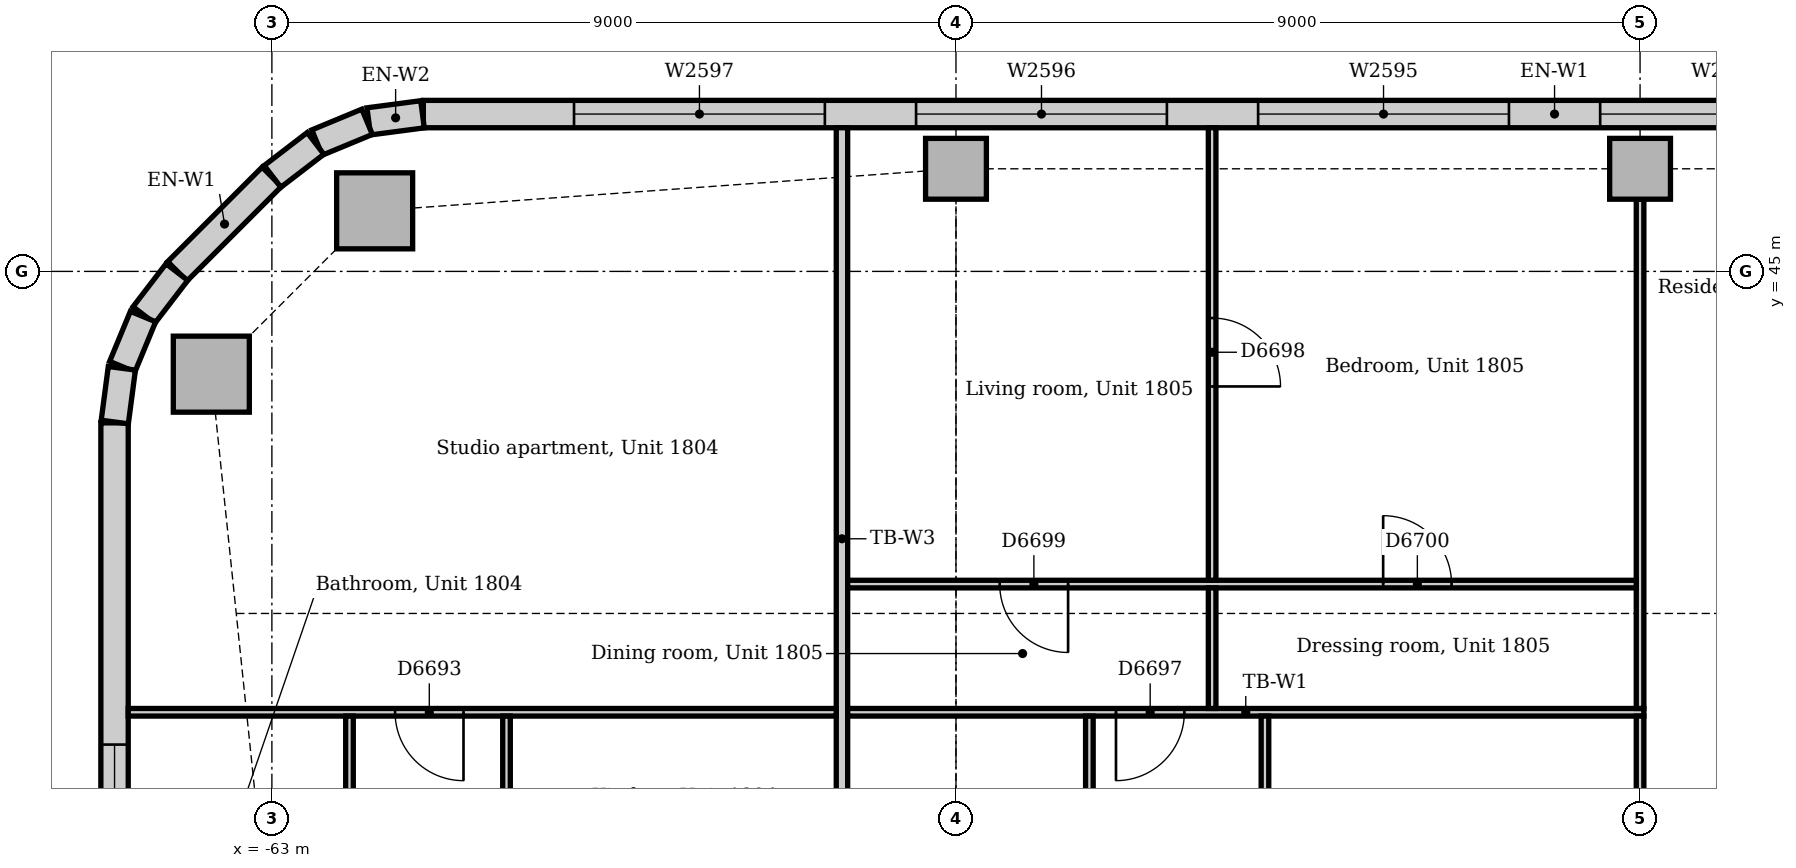
"""IFC4 building model, lengths in metres.
Left out: names, types, materials, properties, quantities, classifications, styles, units other than length and angle.
Written with IfcOpenShell. Run it as: python <this file> out.ifc"""

import sys

from ifc_helpers import new_model, si_unit, direction, frame, frame_2d, origin, origin_2d, place, context, subcontext, project, spatial, rectangle, extrude, element, fill, save


model = new_model("IFC4")
c1 = context("Model", 3, precision=1e-05, world=origin(), true_north=direction((0.0, 1.0)))
c2 = subcontext(c1, "Body", "Model", "MODEL_VIEW")
j1 = project(units=[si_unit("LENGTHUNIT", "METRE"), si_unit("PLANEANGLEUNIT", "RADIAN")], contexts=[c1])
p1 = place(None, origin())
s1 = spatial("IfcSite", under=j1, at=p1, CompositionType="ELEMENT")
p2 = place(p1, origin())
s2 = spatial("IfcBuilding", under=s1, at=p2, CompositionType="ELEMENT")
p3 = place(p2, frame((0.0, 0.0, 79.0)))
s3 = spatial("IfcBuildingStorey", under=s2, at=p3, CompositionType="ELEMENT", Elevation=79.0)
for number, where, z_axis, x_axis in (
    (1, (-61.648, 45.797, 0.0), (0.0, 0.0, 1.0), (1.0, 0.0, 0.0)),
    (2, (-63.797, 43.648, 0.0), (0.0, 0.0, 1.0), (1.0, 0.0, 0.0)),
):
    element("IfcColumn", number, at=place(p3, frame(where, z_axis=z_axis, x_axis=x_axis)), inside=s3, PredefinedType="COLUMN", context=c2, shape_type="SweptSolid", body=[
        extrude(rectangle(XDim=1.0, YDim=1.0, at=origin_2d()), origin(), (0.0, 0.0, 1.0), 3.85),
    ])
for number, where, z_axis, x_axis in (
    (3, (-54.0, 46.35, 0.0), (0.0, 0.0, 1.0), (1.0, 0.0, 0.0)),
    (4, (-45.0, 46.35, 0.0), (0.0, 0.0, 1.0), (1.0, 0.0, 0.0)),
):
    element("IfcColumn", number, at=place(p3, frame(where, z_axis=z_axis, x_axis=x_axis)), inside=s3, PredefinedType="COLUMN", context=c2, shape_type="SweptSolid", body=[
        extrude(rectangle(XDim=0.8, YDim=0.8, at=origin_2d()), origin(), (0.0, 0.0, 1.0), 3.85),
    ])
p4 = place(p3, frame((-31.243, 47.07, 0.0), z_axis=(0.0, 0.0, 1.0), x_axis=(-1.0, 0.0, 0.0)))
e5 = element("IfcWall", 5, at=p4, inside=s3, PredefinedType="STANDARD", context=c2, shape_type="SweptSolid", body=[
    extrude(rectangle(XDim=29.765, YDim=0.36, at=frame_2d((14.882, 0.0))), origin(), (0.0, 0.0, 1.0), 3.85),
])
p5 = place(p4, frame((1.982, 0.0, 0.9)))
e6 = element("IfcOpeningElement", 6, at=p5, cuts=e5, PredefinedType="OPENING", context=c2, shape_type="SweptSolid", body=[
    extrude(rectangle(XDim=3.3, YDim=1.6, at=frame_2d((1.65, 0.8))), frame((0.0, 0.19, 0.0), z_axis=(0.0, -1.0, 0.0), x_axis=(1.0, 0.0, 0.0)), (0.0, 0.0, 1.0), 0.38),
])
p6 = place(p4, frame((6.482, 0.0, 0.9)))
e7 = element("IfcOpeningElement", 7, at=p6, cuts=e5, PredefinedType="OPENING", context=c2, shape_type="SweptSolid", body=[
    extrude(rectangle(XDim=3.3, YDim=1.6, at=frame_2d((1.65, 0.8))), frame((0.0, 0.19, 0.0), z_axis=(0.0, -1.0, 0.0), x_axis=(1.0, 0.0, 0.0)), (0.0, 0.0, 1.0), 0.38),
])
p7 = place(p4, frame((10.982, 0.0, 0.9)))
e8 = element("IfcOpeningElement", 8, at=p7, cuts=e5, PredefinedType="OPENING", context=c2, shape_type="SweptSolid", body=[
    extrude(rectangle(XDim=3.3, YDim=1.6, at=frame_2d((1.65, 0.8))), frame((0.0, 0.19, 0.0), z_axis=(0.0, -1.0, 0.0), x_axis=(1.0, 0.0, 0.0)), (0.0, 0.0, 1.0), 0.38),
])
p8 = place(p4, frame((15.482, 0.0, 0.9)))
e9 = element("IfcOpeningElement", 9, at=p8, cuts=e5, PredefinedType="OPENING", context=c2, shape_type="SweptSolid", body=[
    extrude(rectangle(XDim=3.3, YDim=1.6, at=frame_2d((1.65, 0.8))), frame((0.0, 0.19, 0.0), z_axis=(0.0, -1.0, 0.0), x_axis=(1.0, 0.0, 0.0)), (0.0, 0.0, 1.0), 0.38),
])
p9 = place(p4, frame((19.982, 0.0, 0.9)))
e10 = element("IfcOpeningElement", 10, at=p9, cuts=e5, PredefinedType="OPENING", context=c2, shape_type="SweptSolid", body=[
    extrude(rectangle(XDim=3.3, YDim=1.6, at=frame_2d((1.65, 0.8))), frame((0.0, 0.19, 0.0), z_axis=(0.0, -1.0, 0.0), x_axis=(1.0, 0.0, 0.0)), (0.0, 0.0, 1.0), 0.38),
])
p10 = place(p4, frame((24.482, 0.0, 0.9)))
e11 = element("IfcOpeningElement", 11, at=p10, cuts=e5, PredefinedType="OPENING", context=c2, shape_type="SweptSolid", body=[
    extrude(rectangle(XDim=3.3, YDim=1.6, at=frame_2d((1.65, 0.8))), frame((0.0, 0.19, 0.0), z_axis=(0.0, -1.0, 0.0), x_axis=(1.0, 0.0, 0.0)), (0.0, 0.0, 1.0), 0.38),
])
p11 = place(p3, frame((-63.001, 46.244, 0.0), z_axis=(0.0, 0.0, 1.0), x_axis=(-0.707106781187, -0.707106781187, 0.0)))
e12 = element("IfcWall", 12, at=p11, inside=s3, PredefinedType="STANDARD", context=c2, shape_type="SweptSolid", body=[
    extrude(rectangle(XDim=1.757, YDim=0.36, at=frame_2d((0.879, 0.0))), origin(), (0.0, 0.0, 1.0), 3.85),
])
p12 = place(p3, frame((-65.07, 43.007, 0.0), z_axis=(0.0, 0.0, 1.0), x_axis=(0.0, -1.0, 0.0)))
e13 = element("IfcWall", 13, at=p12, inside=s3, PredefinedType="STANDARD", context=c2, shape_type="SweptSolid", body=[
    extrude(rectangle(XDim=23.765, YDim=0.36, at=frame_2d((11.882, 0.0))), origin(), (0.0, 0.0, 1.0), 3.85),
])
p13 = place(p12, frame((4.232, 0.0, 0.9)))
e14 = element("IfcOpeningElement", 14, at=p13, cuts=e13, PredefinedType="OPENING", context=c2, shape_type="SweptSolid", body=[
    extrude(rectangle(XDim=1.8, YDim=1.6, at=frame_2d((0.9, 0.8))), frame((0.0, 0.19, 0.0), z_axis=(0.0, -1.0, 0.0), x_axis=(1.0, 0.0, 0.0)), (0.0, 0.0, 1.0), 0.38),
])
p14 = place(p12, frame((9.332, 0.0, 0.9)))
e15 = element("IfcOpeningElement", 15, at=p14, cuts=e13, PredefinedType="OPENING", context=c2, shape_type="SweptSolid", body=[
    extrude(rectangle(XDim=1.8, YDim=1.6, at=frame_2d((0.9, 0.8))), frame((0.0, 0.19, 0.0), z_axis=(0.0, -1.0, 0.0), x_axis=(1.0, 0.0, 0.0)), (0.0, 0.0, 1.0), 0.38),
])
p15 = place(p12, frame((12.482, 0.0, 0.9)))
e16 = element("IfcOpeningElement", 16, at=p15, cuts=e13, PredefinedType="OPENING", context=c2, shape_type="SweptSolid", body=[
    extrude(rectangle(XDim=3.3, YDim=1.6, at=frame_2d((1.65, 0.8))), frame((0.0, 0.19, 0.0), z_axis=(0.0, -1.0, 0.0), x_axis=(1.0, 0.0, 0.0)), (0.0, 0.0, 1.0), 0.38),
])
p16 = place(p12, frame((16.982, 0.0, 0.9)))
e17 = element("IfcOpeningElement", 17, at=p16, cuts=e13, PredefinedType="OPENING", context=c2, shape_type="SweptSolid", body=[
    extrude(rectangle(XDim=3.3, YDim=1.6, at=frame_2d((1.65, 0.8))), frame((0.0, 0.19, 0.0), z_axis=(0.0, -1.0, 0.0), x_axis=(1.0, 0.0, 0.0)), (0.0, 0.0, 1.0), 0.38),
])
for number, where, z_axis, x_axis in (
    (18, (-61.019, 47.067, 0.0), (0.0, 0.0, 1.0), (-0.991, -0.131, 0.0)),
    (19, (-61.747, 46.968, 0.0), (0.0, 0.0, 1.0), (-0.924, -0.383, 0.0)),
):
    element("IfcWall", number, at=place(p3, frame(where, z_axis=z_axis, x_axis=x_axis)), inside=s3, PredefinedType="STANDARD", context=c2, shape_type="SweptSolid", body=[
        extrude(rectangle(XDim=0.713, YDim=0.36, at=frame_2d((0.356, 0.0))), origin(), (0.0, 0.0, 1.0), 3.85),
    ])
for number, where, z_axis, x_axis in (
    (20, (-62.425, 46.684, 0.0), (0.0, 0.0, 1.0), (-0.793, -0.609, 0.0)),
    (21, (-64.25, 44.991, 0.0), (0.0, 0.0, 1.0), (-0.609, -0.793, 0.0)),
):
    element("IfcWall", number, at=place(p3, frame(where, z_axis=z_axis, x_axis=x_axis)), inside=s3, PredefinedType="STANDARD", context=c2, shape_type="SweptSolid", body=[
        extrude(rectangle(XDim=0.713, YDim=0.36, at=frame_2d((0.357, 0.0))), origin(), (0.0, 0.0, 1.0), 3.85),
    ])
for number, where, z_axis, x_axis in (
    (22, (-64.695, 44.406, 0.0), (0.0, 0.0, 1.0), (-0.383, -0.924, 0.0)),
    (23, (-64.974, 43.726, 0.0), (0.0, 0.0, 1.0), (-0.131, -0.991, 0.0)),
):
    element("IfcWall", number, at=place(p3, frame(where, z_axis=z_axis, x_axis=x_axis)), inside=s3, PredefinedType="STANDARD", context=c2, shape_type="SweptSolid", body=[
        extrude(rectangle(XDim=0.713, YDim=0.36, at=frame_2d((0.356, 0.0))), origin(), (0.0, 0.0, 1.0), 3.85),
    ])
p17 = place(p3, frame((-55.5, 36.075, 0.0), z_axis=(0.0, 0.0, 1.0), x_axis=(0.0, 1.0, 0.0)))
e24 = element("IfcWall", 24, at=p17, inside=s3, PredefinedType="PARTITIONING", context=c2, shape_type="SweptSolid", body=[
    extrude(rectangle(XDim=10.815, YDim=0.15, at=frame_2d((5.407, 0.0))), origin(), (0.0, 0.0, 1.0), 3.85),
])
p18 = place(p3, frame((-55.425, 39.2, 0.0), z_axis=(0.0, 0.0, 1.0), x_axis=(1.0, 0.0, 0.0)))
e25 = element("IfcWall", 25, at=p18, inside=s3, PredefinedType="PARTITIONING", context=c2, shape_type="SweptSolid", body=[
    extrude(rectangle(XDim=10.475, YDim=0.1, at=frame_2d((5.237, 0.0))), origin(), (0.0, 0.0, 1.0), 3.85),
])
p19 = place(p18, frame((3.53, 0.0, 0.0)))
e26 = element("IfcOpeningElement", 26, at=p19, cuts=e25, PredefinedType="OPENING", context=c2, shape_type="SweptSolid", body=[
    extrude(rectangle(XDim=0.9, YDim=2.1, at=frame_2d((0.45, 1.05))), frame((0.0, 0.06, 0.0), z_axis=(0.0, -1.0, 0.0), x_axis=(1.0, 0.0, 0.0)), (0.0, 0.0, 1.0), 0.12),
])
p20 = place(p3, frame((-64.89, 39.2, 0.0), z_axis=(0.0, 0.0, 1.0), x_axis=(1.0, 0.0, 0.0)))
e27 = element("IfcWall", 27, at=p20, inside=s3, PredefinedType="PARTITIONING", context=c2, shape_type="SweptSolid", body=[
    extrude(rectangle(XDim=9.315, YDim=0.1, at=frame_2d((4.657, 0.0))), origin(), (0.0, 0.0, 1.0), 3.85),
])
p21 = place(p20, frame((3.511, 0.0, 0.0)))
e28 = element("IfcOpeningElement", 28, at=p21, cuts=e27, PredefinedType="OPENING", context=c2, shape_type="SweptSolid", body=[
    extrude(rectangle(XDim=0.9, YDim=2.1, at=frame_2d((0.45, 1.05))), frame((0.0, 0.06, 0.0), z_axis=(0.0, -1.0, 0.0), x_axis=(1.0, 0.0, 0.0)), (0.0, 0.0, 1.0), 0.12),
])
p22 = place(p3, frame((-45.0, 39.25, 0.0), z_axis=(0.0, 0.0, 1.0), x_axis=(0.0, 1.0, 0.0)))
e29 = element("IfcWall", 29, at=p22, inside=s3, PredefinedType="PARTITIONING", context=c2, shape_type="SweptSolid", body=[
    extrude(rectangle(XDim=6.7, YDim=0.1, at=frame_2d((3.35, 0.0))), origin(), (0.0, 0.0, 1.0), 3.256),
])
p23 = place(p3, frame((-45.0, 36.35, 0.0), z_axis=(0.0, 0.0, 1.0), x_axis=(0.0, 1.0, 0.0)))
e30 = element("IfcWall", 30, at=p23, inside=s3, PredefinedType="PARTITIONING", context=c2, shape_type="SweptSolid", body=[
    extrude(rectangle(XDim=2.8, YDim=0.1, at=frame_2d((1.4, 0.0))), origin(), (0.0, 0.0, 1.0), 3.256),
])
p24 = place(p3, frame((-55.425, 40.886, 0.0), z_axis=(0.0, 0.0, 1.0), x_axis=(1.0, 0.0, 0.0)))
e31 = element("IfcWall", 31, at=p24, inside=s3, PredefinedType="PARTITIONING", context=c2, shape_type="SweptSolid", body=[
    extrude(rectangle(XDim=10.375, YDim=0.1, at=frame_2d((5.188, 0.0))), origin(), (0.0, 0.0, 1.0), 3.85),
])
p25 = place(p24, frame((2.0, 0.0, 0.0)))
e32 = element("IfcOpeningElement", 32, at=p25, cuts=e31, PredefinedType="OPENING", context=c2, shape_type="SweptSolid", body=[
    extrude(rectangle(XDim=0.9, YDim=2.1, at=frame_2d((0.45, 1.05))), frame((0.0, 0.06, 0.0), z_axis=(0.0, -1.0, 0.0), x_axis=(1.0, 0.0, 0.0)), (0.0, 0.0, 1.0), 0.12),
])
p26 = place(p24, frame((7.045, 0.0, 0.0)))
e33 = element("IfcOpeningElement", 33, at=p26, cuts=e31, PredefinedType="OPENING", context=c2, shape_type="SweptSolid", body=[
    extrude(rectangle(XDim=0.9, YDim=2.1, at=frame_2d((0.45, 1.05))), frame((0.0, 0.06, 0.0), z_axis=(0.0, -1.0, 0.0), x_axis=(1.0, 0.0, 0.0)), (0.0, 0.0, 1.0), 0.12),
])
p27 = place(p3, frame((-50.63, 39.25, 0.0), z_axis=(0.0, 0.0, 1.0), x_axis=(0.0, 1.0, 0.0)))
e34 = element("IfcWall", 34, at=p27, inside=s3, PredefinedType="PARTITIONING", context=c2, shape_type="SweptSolid", body=[
    extrude(rectangle(XDim=1.587, YDim=0.1, at=frame_2d((0.793, 0.0))), origin(), (0.0, 0.0, 1.0), 3.85),
])
p28 = place(p3, frame((-50.63, 40.937, 0.0), z_axis=(0.0, 0.0, 1.0), x_axis=(0.0, 1.0, 0.0)))
e35 = element("IfcWall", 35, at=p28, inside=s3, PredefinedType="PARTITIONING", context=c2, shape_type="SweptSolid", body=[
    extrude(rectangle(XDim=5.954, YDim=0.1, at=frame_2d((2.977, 0.0))), origin(), (0.0, 0.0, 1.0), 3.85),
])
p29 = place(p28, frame((2.55, 0.0, 0.0)))
e36 = element("IfcOpeningElement", 36, at=p29, cuts=e35, PredefinedType="OPENING", context=c2, shape_type="SweptSolid", body=[
    extrude(rectangle(XDim=0.9, YDim=2.1, at=frame_2d((0.45, 1.05))), frame((0.0, 0.06, 0.0), z_axis=(0.0, -1.0, 0.0), x_axis=(1.0, 0.0, 0.0)), (0.0, 0.0, 1.0), 0.12),
])
p30 = place(p3, frame((-61.979, 36.075, 0.0), z_axis=(0.0, 0.0, 1.0), x_axis=(0.0, 1.0, 0.0)))
e37 = element("IfcWall", 37, at=p30, inside=s3, PredefinedType="PARTITIONING", context=c2, shape_type="SweptSolid", body=[
    extrude(rectangle(XDim=3.075, YDim=0.1, at=frame_2d((1.538, 0.0))), origin(), (0.0, 0.0, 1.0), 3.85),
])
p31 = place(p30, frame((1.1, 0.0, 0.0)))
e38 = element("IfcOpeningElement", 38, at=p31, cuts=e37, PredefinedType="OPENING", context=c2, shape_type="SweptSolid", body=[
    extrude(rectangle(XDim=0.9, YDim=2.1, at=frame_2d((0.45, 1.05))), frame((0.0, 0.06, 0.0), z_axis=(0.0, -1.0, 0.0), x_axis=(1.0, 0.0, 0.0)), (0.0, 0.0, 1.0), 0.12),
])
p32 = place(p3, frame((-59.913, 36.075, 0.0), z_axis=(0.0, 0.0, 1.0), x_axis=(0.0, 1.0, 0.0)))
e39 = element("IfcWall", 39, at=p32, inside=s3, PredefinedType="PARTITIONING", context=c2, shape_type="SweptSolid", body=[
    extrude(rectangle(XDim=3.075, YDim=0.1, at=frame_2d((1.538, 0.0))), origin(), (0.0, 0.0, 1.0), 3.85),
])
p33 = place(p32, frame((1.1, 0.0, 0.0)))
e40 = element("IfcOpeningElement", 40, at=p33, cuts=e39, PredefinedType="OPENING", context=c2, shape_type="SweptSolid", body=[
    extrude(rectangle(XDim=0.9, YDim=2.1, at=frame_2d((0.45, 1.05))), frame((0.0, 0.06, 0.0), z_axis=(0.0, -1.0, 0.0), x_axis=(1.0, 0.0, 0.0)), (0.0, 0.0, 1.0), 0.12),
])
p34 = place(p3, frame((-52.245, 36.075, 0.0), z_axis=(0.0, 0.0, 1.0), x_axis=(0.0, 1.0, 0.0)))
e41 = element("IfcWall", 41, at=p34, inside=s3, PredefinedType="PARTITIONING", context=c2, shape_type="SweptSolid", body=[
    extrude(rectangle(XDim=3.075, YDim=0.1, at=frame_2d((1.538, 0.0))), origin(), (0.0, 0.0, 1.0), 3.85),
])
p35 = place(p34, frame((1.1, 0.0, 0.0)))
e42 = element("IfcOpeningElement", 42, at=p35, cuts=e41, PredefinedType="OPENING", context=c2, shape_type="SweptSolid", body=[
    extrude(rectangle(XDim=0.9, YDim=2.1, at=frame_2d((0.45, 1.05))), frame((0.0, 0.06, 0.0), z_axis=(0.0, -1.0, 0.0), x_axis=(1.0, 0.0, 0.0)), (0.0, 0.0, 1.0), 0.12),
])
p36 = place(p3, frame((-49.935, 36.075, 0.0), z_axis=(0.0, 0.0, 1.0), x_axis=(0.0, 1.0, 0.0)))
e43 = element("IfcWall", 43, at=p36, inside=s3, PredefinedType="PARTITIONING", context=c2, shape_type="SweptSolid", body=[
    extrude(rectangle(XDim=3.075, YDim=0.1, at=frame_2d((1.538, 0.0))), origin(), (0.0, 0.0, 1.0), 3.85),
])
p37 = place(p36, frame((1.1, 0.0, 0.0)))
e44 = element("IfcOpeningElement", 44, at=p37, cuts=e43, PredefinedType="OPENING", context=c2, shape_type="SweptSolid", body=[
    extrude(rectangle(XDim=0.9, YDim=2.1, at=frame_2d((0.45, 1.05))), frame((0.0, 0.06, 0.0), z_axis=(0.0, -1.0, 0.0), x_axis=(1.0, 0.0, 0.0)), (0.0, 0.0, 1.0), 0.12),
])
p38 = place(p7, origin())
e45 = element("IfcWindow", 45, at=p38, inside=s3, PartitioningType="SINGLE_PANEL", PredefinedType="WINDOW", context=c2, shape_type="SweptSolid", body=[
    extrude(rectangle(XDim=3.3, YDim=1.6, at=frame_2d((1.65, 0.8))), frame((0.0, 0.13, 0.0), z_axis=(0.0, -1.0, 0.0), x_axis=(1.0, 0.0, 0.0)), (0.0, 0.0, 1.0), 0.06),
])
fill(e8, e45)
p39 = place(p8, origin())
e46 = element("IfcWindow", 46, at=p39, inside=s3, PartitioningType="SINGLE_PANEL", PredefinedType="WINDOW", context=c2, shape_type="SweptSolid", body=[
    extrude(rectangle(XDim=3.3, YDim=1.6, at=frame_2d((1.65, 0.8))), frame((0.0, 0.13, 0.0), z_axis=(0.0, -1.0, 0.0), x_axis=(1.0, 0.0, 0.0)), (0.0, 0.0, 1.0), 0.06),
])
fill(e9, e46)
p40 = place(p9, origin())
e47 = element("IfcWindow", 47, at=p40, inside=s3, PartitioningType="SINGLE_PANEL", PredefinedType="WINDOW", context=c2, shape_type="SweptSolid", body=[
    extrude(rectangle(XDim=3.3, YDim=1.6, at=frame_2d((1.65, 0.8))), frame((0.0, 0.13, 0.0), z_axis=(0.0, -1.0, 0.0), x_axis=(1.0, 0.0, 0.0)), (0.0, 0.0, 1.0), 0.06),
])
fill(e10, e47)
p41 = place(p10, origin())
e48 = element("IfcWindow", 48, at=p41, inside=s3, PartitioningType="SINGLE_PANEL", PredefinedType="WINDOW", context=c2, shape_type="SweptSolid", body=[
    extrude(rectangle(XDim=3.3, YDim=1.6, at=frame_2d((1.65, 0.8))), frame((0.0, 0.13, 0.0), z_axis=(0.0, -1.0, 0.0), x_axis=(1.0, 0.0, 0.0)), (0.0, 0.0, 1.0), 0.06),
])
fill(e11, e48)
p42 = place(p13, origin())
e49 = element("IfcWindow", 49, at=p42, inside=s3, PartitioningType="SINGLE_PANEL", PredefinedType="WINDOW", context=c2, shape_type="SweptSolid", body=[
    extrude(rectangle(XDim=1.8, YDim=1.6, at=frame_2d((0.9, 0.8))), frame((0.0, 0.13, 0.0), z_axis=(0.0, -1.0, 0.0), x_axis=(1.0, 0.0, 0.0)), (0.0, 0.0, 1.0), 0.06),
])
fill(e14, e49)
p43 = place(p21, frame((0.9, 0.0, 0.0), z_axis=(0.0, 0.0, 1.0), x_axis=(-1.0, 0.0, 0.0)))
e50 = element("IfcDoor", 50, at=p43, inside=s3, OperationType="SINGLE_SWING_LEFT", PredefinedType="DOOR", context=c2, shape_type="SweptSolid", body=[
    extrude(rectangle(XDim=0.9, YDim=2.1, at=frame_2d((0.45, 1.05))), frame((0.0, 0.025, 0.0), z_axis=(0.0, -1.0, 0.0), x_axis=(1.0, 0.0, 0.0)), (0.0, 0.0, 1.0), 0.05),
])
fill(e28, e50)
p44 = place(p19, frame((0.9, 0.0, 0.0), z_axis=(0.0, 0.0, 1.0), x_axis=(-1.0, 0.0, 0.0)))
e51 = element("IfcDoor", 51, at=p44, inside=s3, OperationType="SINGLE_SWING_RIGHT", PredefinedType="DOOR", context=c2, shape_type="SweptSolid", body=[
    extrude(rectangle(XDim=0.9, YDim=2.1, at=frame_2d((0.45, 1.05))), frame((0.0, 0.025, 0.0), z_axis=(0.0, -1.0, 0.0), x_axis=(1.0, 0.0, 0.0)), (0.0, 0.0, 1.0), 0.05),
])
fill(e26, e51)
p45 = place(p29, frame((0.9, 0.0, 0.0), z_axis=(0.0, 0.0, 1.0), x_axis=(-1.0, 0.0, 0.0)))
e52 = element("IfcDoor", 52, at=p45, inside=s3, OperationType="SINGLE_SWING_RIGHT", PredefinedType="DOOR", context=c2, shape_type="SweptSolid", body=[
    extrude(rectangle(XDim=0.9, YDim=2.1, at=frame_2d((0.45, 1.05))), frame((0.0, 0.025, 0.0), z_axis=(0.0, -1.0, 0.0), x_axis=(1.0, 0.0, 0.0)), (0.0, 0.0, 1.0), 0.05),
])
fill(e36, e52)
p46 = place(p25, frame((0.9, 0.0, 0.0), z_axis=(0.0, 0.0, 1.0), x_axis=(-1.0, 0.0, 0.0)))
e53 = element("IfcDoor", 53, at=p46, inside=s3, OperationType="SINGLE_SWING_LEFT", PredefinedType="DOOR", context=c2, shape_type="SweptSolid", body=[
    extrude(rectangle(XDim=0.9, YDim=2.1, at=frame_2d((0.45, 1.05))), frame((0.0, 0.025, 0.0), z_axis=(0.0, -1.0, 0.0), x_axis=(1.0, 0.0, 0.0)), (0.0, 0.0, 1.0), 0.05),
])
fill(e32, e53)
p47 = place(p26, origin())
e54 = element("IfcDoor", 54, at=p47, inside=s3, OperationType="SINGLE_SWING_LEFT", PredefinedType="DOOR", context=c2, shape_type="SweptSolid", body=[
    extrude(rectangle(XDim=0.9, YDim=2.1, at=frame_2d((0.45, 1.05))), frame((0.0, 0.025, 0.0), z_axis=(0.0, -1.0, 0.0), x_axis=(1.0, 0.0, 0.0)), (0.0, 0.0, 1.0), 0.05),
])
fill(e33, e54)
save(model, sys.argv[1])
